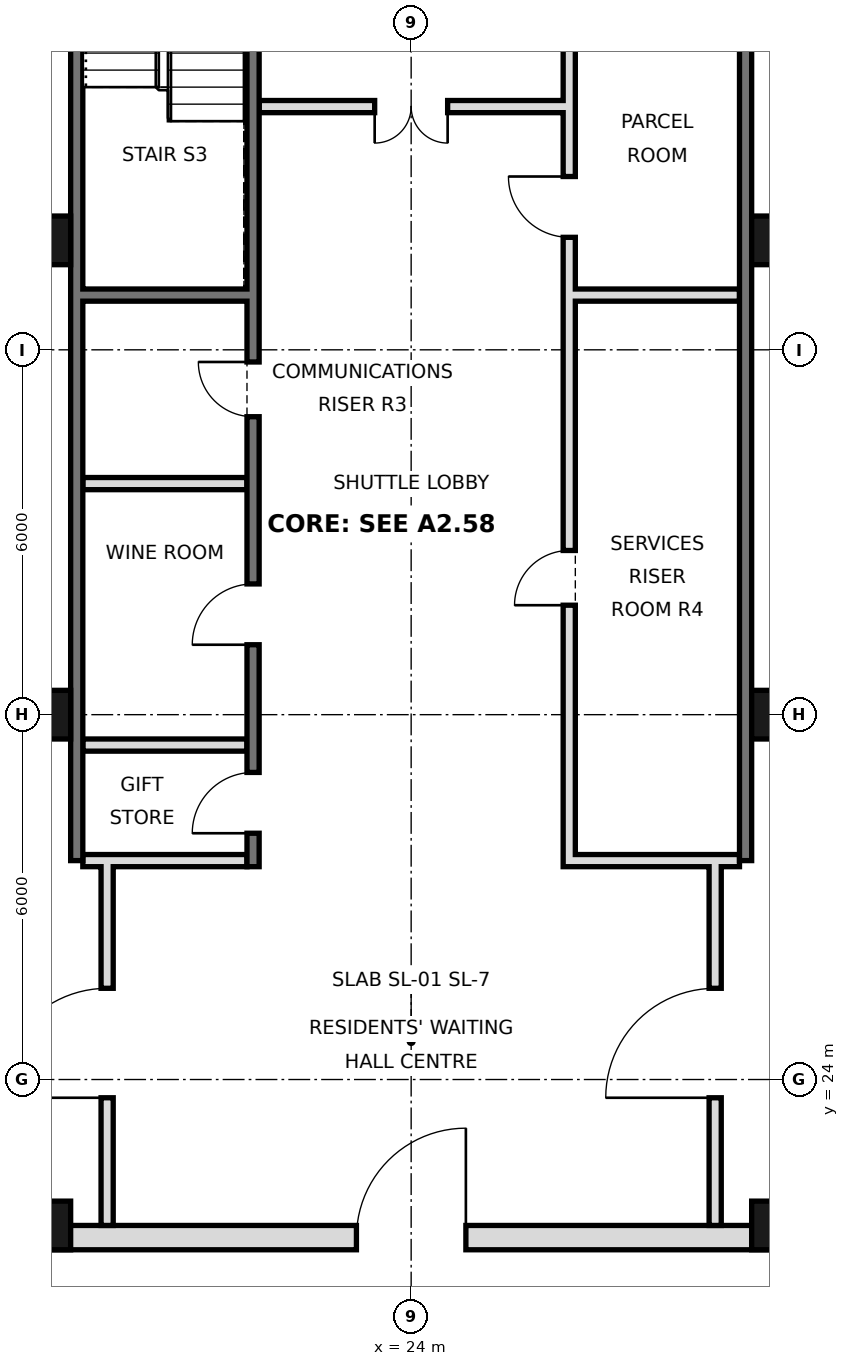
"""IFC4 building model, lengths in metres.
Left out: names, types, materials, properties, quantities, classifications, styles, units other than length and angle.
Written with IfcOpenShell. Run it as: python <this file> out.ifc"""

import sys

from ifc_helpers import new_model, si_unit, direction, frame, frame_2d, origin, origin_2d, place, context, subcontext, project, spatial, rectangle, hollow_rectangle, extrude, element, fill, save


model = new_model("IFC4")
c1 = context("Model", 3, precision=1e-05, world=origin(), true_north=direction((0.0, 1.0)))
c2 = subcontext(c1, "Body", "Model", "MODEL_VIEW")
j1 = project(units=[si_unit("LENGTHUNIT", "METRE"), si_unit("PLANEANGLEUNIT", "RADIAN")], contexts=[c1])
p1 = place(None, origin())
s1 = spatial("IfcSite", under=j1, at=p1, CompositionType="ELEMENT")
p2 = place(p1, origin())
s2 = spatial("IfcBuilding", under=s1, at=p2, CompositionType="ELEMENT")
p3 = place(p2, frame((0.0, 0.0, 229.8)))
s3 = spatial("IfcBuildingStorey", under=s2, at=p3, CompositionType="ELEMENT", Elevation=229.8)
for number, where, z_axis, x_axis in (
    (1, (18.0, 21.6, 0.0), (0.0, 0.0, 1.0), (1.0, 0.0, 0.0)),
    (2, (18.0, 30.0, 0.0), (0.0, 0.0, 1.0), (1.0, 0.0, 0.0)),
    (3, (18.0, 37.8, 0.0), (0.0, 0.0, 1.0), (1.0, 0.0, 0.0)),
    (4, (30.0, 21.6, 0.0), (0.0, 0.0, 1.0), (1.0, 0.0, 0.0)),
    (5, (30.0, 30.0, 0.0), (0.0, 0.0, 1.0), (1.0, 0.0, 0.0)),
    (6, (30.0, 37.8, 0.0), (0.0, 0.0, 1.0), (1.0, 0.0, 0.0)),
):
    element("IfcColumn", number, at=place(p3, frame(where, z_axis=z_axis, x_axis=x_axis)), inside=s3, PredefinedType="COLUMN", context=c2, shape_type="SweptSolid", body=[
        extrude(hollow_rectangle(XDim=0.8, YDim=0.8, WallThickness=0.04, at=origin_2d()), origin(), (0.0, 0.0, 1.0), 4.4),
    ])
for number, where, z_axis, x_axis in (
    (7, (18.5, 27.6, 0.0), (0.0, 0.0, 1.0), (0.0, 1.0, 0.0)),
    (8, (29.5, 27.6, 0.0), (0.0, 0.0, 1.0), (0.0, 1.0, 0.0)),
):
    element("IfcWall", number, at=place(p3, frame(where, z_axis=z_axis, x_axis=x_axis)), inside=s3, PredefinedType="SOLIDWALL", context=c2, shape_type="SweptSolid", body=[
        extrude(rectangle(XDim=17.5, YDim=0.2, at=frame_2d((8.75, 0.0))), origin(), (0.0, 0.0, 1.0), 4.1),
    ])
p4 = place(p3, frame((5.6, 21.4, 0.0), z_axis=(0.0, 0.0, 1.0), x_axis=(1.0, 0.0, 0.0)))
e9 = element("IfcWall", 9, at=p4, inside=s3, PredefinedType="SOLIDWALL", context=c2, shape_type="SweptSolid", body=[
    extrude(rectangle(XDim=36.8, YDim=0.4, at=frame_2d((18.4, 0.0))), origin(), (0.0, 0.0, 1.0), 4.1),
])
p5 = place(p4, frame((8.5, 0.0, 0.0)))
e10 = element("IfcOpeningElement", 10, at=p5, cuts=e9, PredefinedType="OPENING", context=c2, shape_type="SweptSolid", body=[
    extrude(rectangle(XDim=1.8, YDim=2.1, at=frame_2d((0.9, 1.05))), frame((0.0, 0.21, 0.0), z_axis=(0.0, -1.0, 0.0), x_axis=(1.0, 0.0, 0.0)), (0.0, 0.0, 1.0), 0.42),
])
p6 = place(p4, frame((17.5, 0.0, 0.0)))
e11 = element("IfcOpeningElement", 11, at=p6, cuts=e9, PredefinedType="OPENING", context=c2, shape_type="SweptSolid", body=[
    extrude(rectangle(XDim=1.8, YDim=2.1, at=frame_2d((0.9, 1.05))), frame((0.0, 0.21, 0.0), z_axis=(0.0, -1.0, 0.0), x_axis=(1.0, 0.0, 0.0)), (0.0, 0.0, 1.0), 0.42),
])
p7 = place(p4, frame((26.5, 0.0, 0.0)))
e12 = element("IfcOpeningElement", 12, at=p7, cuts=e9, PredefinedType="OPENING", context=c2, shape_type="SweptSolid", body=[
    extrude(rectangle(XDim=1.8, YDim=2.1, at=frame_2d((0.9, 1.05))), frame((0.0, 0.21, 0.0), z_axis=(0.0, -1.0, 0.0), x_axis=(1.0, 0.0, 0.0)), (0.0, 0.0, 1.0), 0.42),
])
p8 = place(p4, frame((4.5, 0.0, 0.0)))
e13 = element("IfcOpeningElement", 13, at=p8, cuts=e9, PredefinedType="OPENING", context=c2, shape_type="SweptSolid", body=[
    extrude(rectangle(XDim=1.2, YDim=2.1, at=frame_2d((0.6, 1.05))), frame((0.0, 0.21, 0.0), z_axis=(0.0, -1.0, 0.0), x_axis=(1.0, 0.0, 0.0)), (0.0, 0.0, 1.0), 0.42),
])
p9 = place(p4, frame((31.1, 0.0, 0.0)))
e14 = element("IfcOpeningElement", 14, at=p9, cuts=e9, PredefinedType="OPENING", context=c2, shape_type="SweptSolid", body=[
    extrude(rectangle(XDim=1.2, YDim=2.1, at=frame_2d((0.6, 1.05))), frame((0.0, 0.21, 0.0), z_axis=(0.0, -1.0, 0.0), x_axis=(1.0, 0.0, 0.0)), (0.0, 0.0, 1.0), 0.42),
])
p10 = place(p3, frame((19.0, 21.6, 0.0), z_axis=(0.0, 0.0, 1.0), x_axis=(0.0, 1.0, 0.0)))
e15 = element("IfcWall", 15, at=p10, inside=s3, PredefinedType="PARTITIONING", context=c2, shape_type="SweptSolid", body=[
    extrude(rectangle(XDim=6.0, YDim=0.2, at=frame_2d((3.0, 0.0))), origin(), (0.0, 0.0, 1.0), 4.1),
])
p11 = place(p10, frame((2.1, 0.0, 0.0)))
e16 = element("IfcOpeningElement", 16, at=p11, cuts=e15, PredefinedType="OPENING", context=c2, shape_type="SweptSolid", body=[
    extrude(rectangle(XDim=1.8, YDim=2.1, at=frame_2d((0.9, 1.05))), frame((0.0, 0.11, 0.0), z_axis=(0.0, -1.0, 0.0), x_axis=(1.0, 0.0, 0.0)), (0.0, 0.0, 1.0), 0.22),
])
p12 = place(p3, frame((29.0, 21.6, 0.0), z_axis=(0.0, 0.0, 1.0), x_axis=(0.0, 1.0, 0.0)))
e17 = element("IfcWall", 17, at=p12, inside=s3, PredefinedType="PARTITIONING", context=c2, shape_type="SweptSolid", body=[
    extrude(rectangle(XDim=6.0, YDim=0.2, at=frame_2d((3.0, 0.0))), origin(), (0.0, 0.0, 1.0), 4.1),
])
p13 = place(p12, frame((2.1, 0.0, 0.0)))
e18 = element("IfcOpeningElement", 18, at=p13, cuts=e17, PredefinedType="OPENING", context=c2, shape_type="SweptSolid", body=[
    extrude(rectangle(XDim=1.8, YDim=2.1, at=frame_2d((0.9, 1.05))), frame((0.0, 0.11, 0.0), z_axis=(0.0, -1.0, 0.0), x_axis=(1.0, 0.0, 0.0)), (0.0, 0.0, 1.0), 0.22),
])
p14 = place(p3, frame((21.4, 27.5, 0.0), z_axis=(0.0, 0.0, 1.0), x_axis=(0.0, 1.0, 0.0)))
e19 = element("IfcWall", 19, at=p14, inside=s3, PredefinedType="SOLIDWALL", context=c2, shape_type="SweptSolid", body=[
    extrude(rectangle(XDim=17.5, YDim=0.2, at=frame_2d((8.75, 0.0))), origin(), (0.0, 0.0, 1.0), 4.1),
])
p15 = place(p14, frame((0.55, 0.0, 0.0)))
e20 = element("IfcOpeningElement", 20, at=p15, cuts=e19, PredefinedType="OPENING", context=c2, shape_type="SweptSolid", body=[
    extrude(rectangle(XDim=1.0, YDim=2.1, at=frame_2d((0.5, 1.05))), frame((0.0, 0.11, 0.0), z_axis=(0.0, -1.0, 0.0), x_axis=(1.0, 0.0, 0.0)), (0.0, 0.0, 1.0), 0.22),
])
p16 = place(p14, frame((3.65, 0.0, 0.0)))
e21 = element("IfcOpeningElement", 21, at=p16, cuts=e19, PredefinedType="OPENING", context=c2, shape_type="SweptSolid", body=[
    extrude(rectangle(XDim=1.0, YDim=2.1, at=frame_2d((0.5, 1.05))), frame((0.0, 0.11, 0.0), z_axis=(0.0, -1.0, 0.0), x_axis=(1.0, 0.0, 0.0)), (0.0, 0.0, 1.0), 0.22),
])
p17 = place(p14, frame((16.2, 0.0, 0.0)))
e22 = element("IfcOpeningElement", 22, at=p17, cuts=e19, PredefinedType="OPENING", context=c2, shape_type="SweptSolid", body=[
    extrude(rectangle(XDim=1.0, YDim=2.1, at=frame_2d((0.5, 1.05))), frame((0.0, 0.11, 0.0), z_axis=(0.0, -1.0, 0.0), x_axis=(1.0, 0.0, 0.0)), (0.0, 0.0, 1.0), 0.22),
])
p18 = place(p14, frame((7.4, 0.0, 0.0)))
e23 = element("IfcOpeningElement", 23, at=p18, cuts=e19, PredefinedType="OPENING", context=c2, shape_type="SweptSolid", body=[
    extrude(rectangle(XDim=0.9, YDim=2.1, at=frame_2d((0.45, 1.05))), frame((0.0, 0.11, 0.0), z_axis=(0.0, -1.0, 0.0), x_axis=(1.0, 0.0, 0.0)), (0.0, 0.0, 1.0), 0.22),
])
p19 = place(p3, frame((26.6, 27.5, 0.0), z_axis=(0.0, 0.0, 1.0), x_axis=(0.0, 1.0, 0.0)))
e24 = element("IfcWall", 24, at=p19, inside=s3, PredefinedType="SOLIDWALL", context=c2, shape_type="SweptSolid", body=[
    extrude(rectangle(XDim=17.5, YDim=0.2, at=frame_2d((8.75, 0.0))), origin(), (0.0, 0.0, 1.0), 4.1),
])
p20 = place(p19, frame((4.3, 0.0, 0.0)))
e25 = element("IfcOpeningElement", 25, at=p20, cuts=e24, PredefinedType="OPENING", context=c2, shape_type="SweptSolid", body=[
    extrude(rectangle(XDim=0.9, YDim=2.1, at=frame_2d((0.45, 1.05))), frame((0.0, 0.11, 0.0), z_axis=(0.0, -1.0, 0.0), x_axis=(1.0, 0.0, 0.0)), (0.0, 0.0, 1.0), 0.22),
])
p21 = place(p19, frame((10.35, 0.0, 0.0)))
e26 = element("IfcOpeningElement", 26, at=p21, cuts=e24, PredefinedType="OPENING", context=c2, shape_type="SweptSolid", body=[
    extrude(rectangle(XDim=1.0, YDim=2.1, at=frame_2d((0.5, 1.05))), frame((0.0, 0.11, 0.0), z_axis=(0.0, -1.0, 0.0), x_axis=(1.0, 0.0, 0.0)), (0.0, 0.0, 1.0), 0.22),
])
p22 = place(p19, frame((15.475, 0.0, 0.0)))
e27 = element("IfcOpeningElement", 27, at=p22, cuts=e24, PredefinedType="OPENING", context=c2, shape_type="SweptSolid", body=[
    extrude(rectangle(XDim=1.0, YDim=2.1, at=frame_2d((0.5, 1.05))), frame((0.0, 0.11, 0.0), z_axis=(0.0, -1.0, 0.0), x_axis=(1.0, 0.0, 0.0)), (0.0, 0.0, 1.0), 0.22),
])
p23 = place(p3, frame((18.6, 27.6, 0.0), z_axis=(0.0, 0.0, 1.0), x_axis=(1.0, 0.0, 0.0)))
e28 = element("IfcWall", 28, at=p23, inside=s3, PredefinedType="PARTITIONING", context=c2, shape_type="SweptSolid", body=[
    extrude(rectangle(XDim=2.7, YDim=0.2, at=frame_2d((1.35, 0.0))), origin(), (0.0, 0.0, 1.0), 4.1),
])
p24 = place(p3, frame((26.7, 27.6, 0.0), z_axis=(0.0, 0.0, 1.0), x_axis=(1.0, 0.0, 0.0)))
e29 = element("IfcWall", 29, at=p24, inside=s3, PredefinedType="SOLIDWALL", context=c2, shape_type="SweptSolid", body=[
    extrude(rectangle(XDim=2.7, YDim=0.2, at=frame_2d((1.35, 0.0))), origin(), (0.0, 0.0, 1.0), 4.1),
])
p25 = place(p3, frame((18.6, 29.5, 0.0), z_axis=(0.0, 0.0, 1.0), x_axis=(1.0, 0.0, 0.0)))
e30 = element("IfcWall", 30, at=p25, inside=s3, PredefinedType="PARTITIONING", context=c2, shape_type="SweptSolid", body=[
    extrude(rectangle(XDim=2.7, YDim=0.2, at=frame_2d((1.35, 0.0))), origin(), (0.0, 0.0, 1.0), 4.1),
])
for number, where, z_axis, x_axis in (
    (31, (18.6, 33.8, 0.0), (0.0, 0.0, 1.0), (1.0, 0.0, 0.0)),
    (32, (18.6, 36.9, 0.0), (0.0, 0.0, 1.0), (1.0, 0.0, 0.0)),
    (33, (26.7, 36.9, 0.0), (0.0, 0.0, 1.0), (1.0, 0.0, 0.0)),
):
    element("IfcWall", number, at=place(p3, frame(where, z_axis=z_axis, x_axis=x_axis)), inside=s3, PredefinedType="SOLIDWALL", context=c2, shape_type="SweptSolid", body=[
        extrude(rectangle(XDim=2.7, YDim=0.2, at=frame_2d((1.35, 0.0))), origin(), (0.0, 0.0, 1.0), 4.1),
    ])
p26 = place(p3, frame((21.5, 40.0, 0.0), z_axis=(0.0, 0.0, 1.0), x_axis=(1.0, 0.0, 0.0)))
e34 = element("IfcWall", 34, at=p26, inside=s3, PredefinedType="PARTITIONING", context=c2, shape_type="SweptSolid", body=[
    extrude(rectangle(XDim=5.0, YDim=0.2, at=frame_2d((2.5, 0.0))), origin(), (0.0, 0.0, 1.0), 4.1),
])
p27 = place(p26, frame((1.9, 0.0, 0.0)))
e35 = element("IfcOpeningElement", 35, at=p27, cuts=e34, PredefinedType="OPENING", context=c2, shape_type="SweptSolid", body=[
    extrude(rectangle(XDim=1.2, YDim=2.1, at=frame_2d((0.6, 1.05))), frame((0.0, 0.11, 0.0), z_axis=(0.0, -1.0, 0.0), x_axis=(1.0, 0.0, 0.0)), (0.0, 0.0, 1.0), 0.22),
])
p28 = place(p11, origin())
e36 = element("IfcDoor", 36, at=p28, inside=s3, OperationType="SINGLE_SWING_LEFT", PredefinedType="DOOR", context=c2, shape_type="SweptSolid", body=[
    extrude(rectangle(XDim=1.8, YDim=2.1, at=frame_2d((0.9, 1.05))), frame((0.0, 0.025, 0.0), z_axis=(0.0, -1.0, 0.0), x_axis=(1.0, 0.0, 0.0)), (0.0, 0.0, 1.0), 0.05),
])
fill(e16, e36)
p29 = place(p6, frame((1.8, 0.0, 0.0), z_axis=(0.0, 0.0, 1.0), x_axis=(-1.0, 0.0, 0.0)))
e37 = element("IfcDoor", 37, at=p29, inside=s3, OperationType="SINGLE_SWING_LEFT", PredefinedType="DOOR", context=c2, shape_type="SweptSolid", body=[
    extrude(rectangle(XDim=1.8, YDim=2.1, at=frame_2d((0.9, 1.05))), frame((0.0, 0.025, 0.0), z_axis=(0.0, -1.0, 0.0), x_axis=(1.0, 0.0, 0.0)), (0.0, 0.0, 1.0), 0.05),
])
fill(e11, e37)
p30 = place(p13, origin())
e38 = element("IfcDoor", 38, at=p30, inside=s3, OperationType="SINGLE_SWING_LEFT", PredefinedType="DOOR", context=c2, shape_type="SweptSolid", body=[
    extrude(rectangle(XDim=1.8, YDim=2.1, at=frame_2d((0.9, 1.05))), frame((0.0, 0.025, 0.0), z_axis=(0.0, -1.0, 0.0), x_axis=(1.0, 0.0, 0.0)), (0.0, 0.0, 1.0), 0.05),
])
fill(e18, e38)
p31 = place(p27, frame((1.2, 0.0, 0.0), z_axis=(0.0, 0.0, 1.0), x_axis=(-1.0, 0.0, 0.0)))
e39 = element("IfcDoor", 39, at=p31, inside=s3, OperationType="DOUBLE_DOOR_SINGLE_SWING", PredefinedType="DOOR", context=c2, shape_type="SweptSolid", body=[
    extrude(rectangle(XDim=1.2, YDim=2.1, at=frame_2d((0.6, 1.05))), frame((0.0, 0.025, 0.0), z_axis=(0.0, -1.0, 0.0), x_axis=(1.0, 0.0, 0.0)), (0.0, 0.0, 1.0), 0.05),
])
fill(e35, e39)
p32 = place(p15, origin())
e40 = element("IfcDoor", 40, at=p32, inside=s3, OperationType="SINGLE_SWING_LEFT", PredefinedType="DOOR", context=c2, shape_type="SweptSolid", body=[
    extrude(rectangle(XDim=1.0, YDim=2.1, at=frame_2d((0.5, 1.05))), frame((0.0, 0.025, 0.0), z_axis=(0.0, -1.0, 0.0), x_axis=(1.0, 0.0, 0.0)), (0.0, 0.0, 1.0), 0.05),
])
fill(e20, e40)
p33 = place(p16, origin())
e41 = element("IfcDoor", 41, at=p33, inside=s3, OperationType="SINGLE_SWING_LEFT", PredefinedType="DOOR", context=c2, shape_type="SweptSolid", body=[
    extrude(rectangle(XDim=1.0, YDim=2.1, at=frame_2d((0.5, 1.05))), frame((0.0, 0.025, 0.0), z_axis=(0.0, -1.0, 0.0), x_axis=(1.0, 0.0, 0.0)), (0.0, 0.0, 1.0), 0.05),
])
fill(e21, e41)
p34 = place(p18, frame((0.9, 0.0, 0.0), z_axis=(0.0, 0.0, 1.0), x_axis=(-1.0, 0.0, 0.0)))
e42 = element("IfcDoor", 42, at=p34, inside=s3, OperationType="SINGLE_SWING_LEFT", PredefinedType="DOOR", context=c2, shape_type="SweptSolid", body=[
    extrude(rectangle(XDim=0.9, YDim=2.1, at=frame_2d((0.45, 1.05))), frame((0.0, 0.025, 0.0), z_axis=(0.0, -1.0, 0.0), x_axis=(1.0, 0.0, 0.0)), (0.0, 0.0, 1.0), 0.05),
])
fill(e23, e42)
p35 = place(p20, origin())
e43 = element("IfcDoor", 43, at=p35, inside=s3, OperationType="SINGLE_SWING_LEFT", PredefinedType="DOOR", context=c2, shape_type="SweptSolid", body=[
    extrude(rectangle(XDim=0.9, YDim=2.1, at=frame_2d((0.45, 1.05))), frame((0.0, 0.025, 0.0), z_axis=(0.0, -1.0, 0.0), x_axis=(1.0, 0.0, 0.0)), (0.0, 0.0, 1.0), 0.05),
])
fill(e25, e43)
p36 = place(p21, frame((1.0, 0.0, 0.0), z_axis=(0.0, 0.0, 1.0), x_axis=(-1.0, 0.0, 0.0)))
e44 = element("IfcDoor", 44, at=p36, inside=s3, OperationType="SINGLE_SWING_LEFT", PredefinedType="DOOR", context=c2, shape_type="SweptSolid", body=[
    extrude(rectangle(XDim=1.0, YDim=2.1, at=frame_2d((0.5, 1.05))), frame((0.0, 0.025, 0.0), z_axis=(0.0, -1.0, 0.0), x_axis=(1.0, 0.0, 0.0)), (0.0, 0.0, 1.0), 0.05),
])
fill(e26, e44)
save(model, sys.argv[1])
